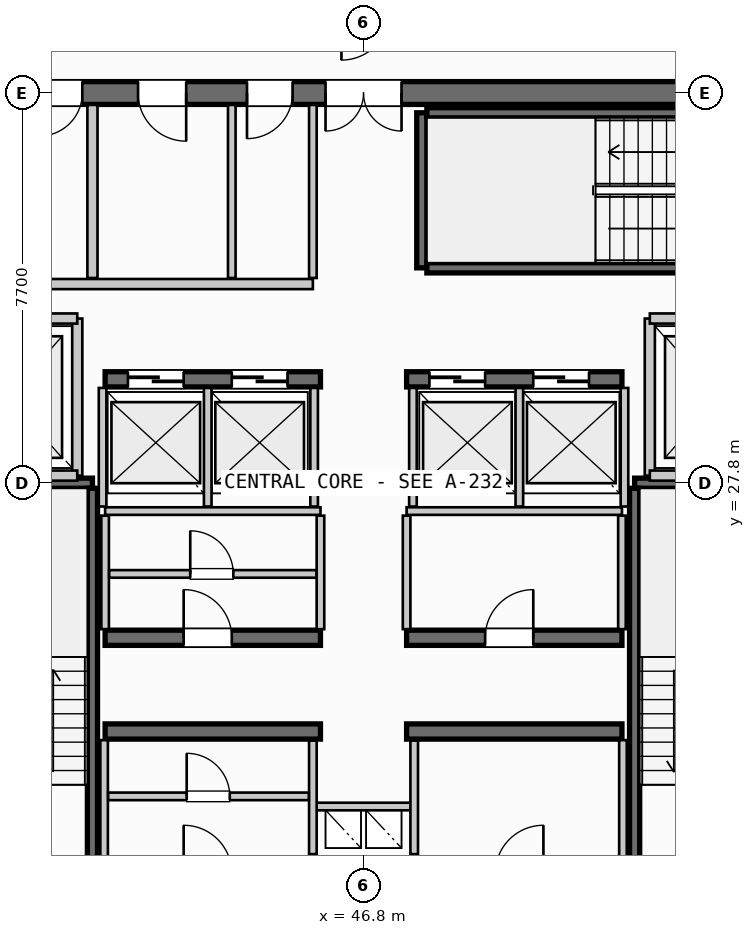
"""IFC4 building model, lengths in metres.
Left out: names, types, materials, properties, quantities, classifications, styles, units other than length and angle.
Written with IfcOpenShell. Run it as: python <this file> out.ifc"""

import sys

from ifc_helpers import new_model, si_unit, direction, frame, frame_2d, origin, place, context, subcontext, project, spatial, rectangle, extrude, source, transform, mapped, element, fill, save


model = new_model("IFC4")
c1 = context("Model", 3, precision=1e-05, world=origin(), true_north=direction((0.0, 1.0)))
c2 = subcontext(c1, "Body", "Model", "MODEL_VIEW")
j1 = project(units=[si_unit("LENGTHUNIT", "METRE"), si_unit("PLANEANGLEUNIT", "RADIAN")], contexts=[c1])
p1 = place(None, origin())
s1 = spatial("IfcSite", under=j1, at=p1, CompositionType="ELEMENT")
p2 = place(p1, origin())
s2 = spatial("IfcBuilding", under=s1, at=p2, CompositionType="ELEMENT")
p3 = place(p2, frame((0.0, 0.0, 235.3)))
s3 = spatial("IfcBuildingStorey", under=s2, at=p3, CompositionType="ELEMENT", Elevation=235.3)
p4 = place(p3, frame((55.6, 35.5, 0.0), z_axis=(0.0, 0.0, 1.0), x_axis=(-1.0, 0.0, 0.0)))
e1 = element("IfcWall", 1, at=p4, inside=s3, PredefinedType="SHEAR", context=c2, shape_type="SweptSolid", body=[
    extrude(rectangle(XDim=17.6, YDim=0.45, at=frame_2d((8.8, 0.0))), origin(), (0.0, 0.0, 1.0), 3.21),
])
p5 = place(p4, frame((8.05, 0.0, 0.0)))
e2 = element("IfcOpeningElement", 2, at=p5, cuts=e1, PredefinedType="OPENING", context=c2, shape_type="SweptSolid", body=[
    extrude(rectangle(XDim=1.5, YDim=2.2, at=frame_2d((0.75, 1.1))), frame((0.0, 0.235, 0.0), z_axis=(0.0, -1.0, 0.0), x_axis=(1.0, 0.0, 0.0)), (0.0, 0.0, 1.0), 0.47),
])
p6 = place(p4, frame((15.85, 0.0, 0.0)))
e3 = element("IfcOpeningElement", 3, at=p6, cuts=e1, PredefinedType="OPENING", context=c2, shape_type="SweptSolid", body=[
    extrude(rectangle(XDim=0.85, YDim=2.15, at=frame_2d((0.425, 1.075))), frame((0.0, 0.235, 0.0), z_axis=(0.0, -1.0, 0.0), x_axis=(1.0, 0.0, 0.0)), (0.0, 0.0, 1.0), 0.47),
])
p7 = place(p4, frame((14.35, 0.0, 0.0)))
e4 = element("IfcOpeningElement", 4, at=p7, cuts=e1, PredefinedType="OPENING", context=c2, shape_type="SweptSolid", body=[
    extrude(rectangle(XDim=0.85, YDim=2.15, at=frame_2d((0.425, 1.075))), frame((0.0, 0.235, 0.0), z_axis=(0.0, -1.0, 0.0), x_axis=(1.0, 0.0, 0.0)), (0.0, 0.0, 1.0), 0.47),
])
p8 = place(p4, frame((12.3, 0.0, 0.0)))
e5 = element("IfcOpeningElement", 5, at=p8, cuts=e1, PredefinedType="OPENING", context=c2, shape_type="SweptSolid", body=[
    extrude(rectangle(XDim=0.95, YDim=2.15, at=frame_2d((0.475, 1.075))), frame((0.0, 0.235, 0.0), z_axis=(0.0, -1.0, 0.0), x_axis=(1.0, 0.0, 0.0)), (0.0, 0.0, 1.0), 0.47),
])
p9 = place(p4, frame((10.2, 0.0, 0.0)))
e6 = element("IfcOpeningElement", 6, at=p9, cuts=e1, PredefinedType="OPENING", context=c2, shape_type="SweptSolid", body=[
    extrude(rectangle(XDim=0.9, YDim=2.15, at=frame_2d((0.45, 1.075))), frame((0.0, 0.235, 0.0), z_axis=(0.0, -1.0, 0.0), x_axis=(1.0, 0.0, 0.0)), (0.0, 0.0, 1.0), 0.47),
])
for number, where, z_axis, x_axis in (
    (7, (41.7, 22.9, 0.0), (0.0, 0.0, 1.0), (1.0, 0.0, 0.0)),
    (8, (47.65, 22.9, 0.0), (0.0, 0.0, 1.0), (1.0, 0.0, 0.0)),
):
    element("IfcWall", number, at=place(p3, frame(where, z_axis=z_axis, x_axis=x_axis)), inside=s3, PredefinedType="SHEAR", context=c2, shape_type="SweptSolid", body=[
        extrude(rectangle(XDim=4.25, YDim=0.3, at=frame_2d((2.125, 0.0))), origin(), (0.0, 0.0, 1.0), 3.21),
    ])
p10 = place(p3, frame((41.7, 24.75, 0.0), z_axis=(0.0, 0.0, 1.0), x_axis=(1.0, 0.0, 0.0)))
e9 = element("IfcWall", 9, at=p10, inside=s3, PredefinedType="SHEAR", context=c2, shape_type="SweptSolid", body=[
    extrude(rectangle(XDim=4.25, YDim=0.3, at=frame_2d((2.125, 0.0))), origin(), (0.0, 0.0, 1.0), 3.21),
])
p11 = place(p10, frame((1.55, 0.0, 0.0)))
e10 = element("IfcOpeningElement", 10, at=p11, cuts=e9, PredefinedType="OPENING", context=c2, shape_type="SweptSolid", body=[
    extrude(rectangle(XDim=0.95, YDim=2.15, at=frame_2d((0.475, 1.075))), frame((0.0, 0.16, 0.0), z_axis=(0.0, -1.0, 0.0), x_axis=(1.0, 0.0, 0.0)), (0.0, 0.0, 1.0), 0.32),
])
p12 = place(p3, frame((47.65, 24.75, 0.0), z_axis=(0.0, 0.0, 1.0), x_axis=(1.0, 0.0, 0.0)))
e11 = element("IfcWall", 11, at=p12, inside=s3, PredefinedType="SHEAR", context=c2, shape_type="SweptSolid", body=[
    extrude(rectangle(XDim=4.25, YDim=0.3, at=frame_2d((2.125, 0.0))), origin(), (0.0, 0.0, 1.0), 3.21),
])
p13 = place(p12, frame((1.55, 0.0, 0.0)))
e12 = element("IfcOpeningElement", 12, at=p13, cuts=e11, PredefinedType="OPENING", context=c2, shape_type="SweptSolid", body=[
    extrude(rectangle(XDim=0.95, YDim=2.15, at=frame_2d((0.475, 1.075))), frame((0.0, 0.16, 0.0), z_axis=(0.0, -1.0, 0.0), x_axis=(1.0, 0.0, 0.0)), (0.0, 0.0, 1.0), 0.32),
])
p14 = place(p3, frame((41.7, 29.85, 0.0), z_axis=(0.0, 0.0, 1.0), x_axis=(1.0, 0.0, 0.0)))
e13 = element("IfcWall", 13, at=p14, inside=s3, PredefinedType="SHEAR", context=c2, shape_type="SweptSolid", body=[
    extrude(rectangle(XDim=4.25, YDim=0.3, at=frame_2d((2.125, 0.0))), origin(), (0.0, 0.0, 1.0), 3.21),
])
p15 = place(p14, frame((0.45, 0.0, 0.0)))
e14 = element("IfcOpeningElement", 14, at=p15, cuts=e13, PredefinedType="OPENING", context=c2, shape_type="SweptSolid", body=[
    extrude(rectangle(XDim=1.1, YDim=2.2, at=frame_2d((0.55, 1.1))), frame((0.0, 0.16, 0.0), z_axis=(0.0, -1.0, 0.0), x_axis=(1.0, 0.0, 0.0)), (0.0, 0.0, 1.0), 0.32),
])
p16 = place(p14, frame((2.5, 0.0, 0.0)))
e15 = element("IfcOpeningElement", 15, at=p16, cuts=e13, PredefinedType="OPENING", context=c2, shape_type="SweptSolid", body=[
    extrude(rectangle(XDim=1.1, YDim=2.2, at=frame_2d((0.55, 1.1))), frame((0.0, 0.16, 0.0), z_axis=(0.0, -1.0, 0.0), x_axis=(1.0, 0.0, 0.0)), (0.0, 0.0, 1.0), 0.32),
])
p17 = place(p3, frame((47.65, 29.85, 0.0), z_axis=(0.0, 0.0, 1.0), x_axis=(1.0, 0.0, 0.0)))
e16 = element("IfcWall", 16, at=p17, inside=s3, PredefinedType="SHEAR", context=c2, shape_type="SweptSolid", body=[
    extrude(rectangle(XDim=4.25, YDim=0.3, at=frame_2d((2.125, 0.0))), origin(), (0.0, 0.0, 1.0), 3.21),
])
p18 = place(p17, frame((0.45, 0.0, 0.0)))
e17 = element("IfcOpeningElement", 17, at=p18, cuts=e16, PredefinedType="OPENING", context=c2, shape_type="SweptSolid", body=[
    extrude(rectangle(XDim=1.1, YDim=2.2, at=frame_2d((0.55, 1.1))), frame((0.0, 0.16, 0.0), z_axis=(0.0, -1.0, 0.0), x_axis=(1.0, 0.0, 0.0)), (0.0, 0.0, 1.0), 0.32),
])
p19 = place(p17, frame((2.5, 0.0, 0.0)))
e18 = element("IfcOpeningElement", 18, at=p19, cuts=e16, PredefinedType="OPENING", context=c2, shape_type="SweptSolid", body=[
    extrude(rectangle(XDim=1.1, YDim=2.2, at=frame_2d((0.55, 1.1))), frame((0.0, 0.16, 0.0), z_axis=(0.0, -1.0, 0.0), x_axis=(1.0, 0.0, 0.0)), (0.0, 0.0, 1.0), 0.32),
])
p20 = place(p3, frame((38.39, 27.8, 0.0), z_axis=(0.0, 0.0, 1.0), x_axis=(1.0, 0.0, 0.0)))
e19 = element("IfcWall", 19, at=p20, inside=s3, PredefinedType="SHEAR", context=c2, shape_type="SweptSolid", body=[
    extrude(rectangle(XDim=3.06, YDim=0.2, at=frame_2d((1.53, 0.0))), origin(), (0.0, 0.0, 1.0), 3.21),
])
p21 = place(p3, frame((41.45, 27.7, 0.0), z_axis=(0.0, 0.0, 1.0), x_axis=(0.0, -1.0, 0.0)))
e20 = element("IfcWall", 20, at=p21, inside=s3, PredefinedType="SHEAR", context=c2, shape_type="SweptSolid", body=[
    extrude(rectangle(XDim=7.35, YDim=0.2, at=frame_2d((3.675, 0.0))), origin(), (0.0, 0.0, 1.0), 3.21),
])
p22 = place(p3, frame((52.15, 27.8, 0.0), z_axis=(0.0, 0.0, 1.0), x_axis=(1.0, 0.0, 0.0)))
e21 = element("IfcWall", 21, at=p22, inside=s3, PredefinedType="SHEAR", context=c2, shape_type="SweptSolid", body=[
    extrude(rectangle(XDim=3.06, YDim=0.2, at=frame_2d((1.53, 0.0))), origin(), (0.0, 0.0, 1.0), 3.21),
])
p23 = place(p3, frame((52.15, 20.35, 0.0), z_axis=(0.0, 0.0, 1.0), x_axis=(0.0, 1.0, 0.0)))
e22 = element("IfcWall", 22, at=p23, inside=s3, PredefinedType="SHEAR", context=c2, shape_type="SweptSolid", body=[
    extrude(rectangle(XDim=7.35, YDim=0.2, at=frame_2d((3.675, 0.0))), origin(), (0.0, 0.0, 1.0), 3.21),
])
p24 = place(p3, frame((47.95, 32.05, 0.0), z_axis=(0.0, 0.0, 1.0), x_axis=(0.0, 1.0, 0.0)))
e23 = element("IfcWall", 23, at=p24, inside=s3, PredefinedType="SHEAR", context=c2, shape_type="SweptSolid", body=[
    extrude(rectangle(XDim=3.06, YDim=0.2, at=frame_2d((1.53, 0.0))), origin(), (0.0, 0.0, 1.0), 3.21),
])
for number, where, z_axis, x_axis in (
    (24, (48.05, 35.11, 0.0), (0.0, 0.0, 1.0), (1.0, 0.0, 0.0)),
    (25, (55.4, 32.05, 0.0), (0.0, 0.0, 1.0), (-1.0, 0.0, 0.0)),
):
    element("IfcWall", number, at=place(p3, frame(where, z_axis=z_axis, x_axis=x_axis)), inside=s3, PredefinedType="SHEAR", context=c2, shape_type="SweptSolid", body=[
        extrude(rectangle(XDim=7.35, YDim=0.2, at=frame_2d((3.675, 0.0))), origin(), (0.0, 0.0, 1.0), 3.21),
    ])
p25 = place(p3, frame((45.8, 21.42, 0.0), z_axis=(0.0, 0.0, 1.0), x_axis=(1.0, 0.0, 0.0)))
e26 = element("IfcWall", 26, at=p25, inside=s3, PredefinedType="PARTITIONING", context=c2, shape_type="SweptSolid", body=[
    extrude(rectangle(XDim=2.0, YDim=0.15, at=frame_2d((1.0, 0.0))), origin(), (0.0, 0.0, 1.0), 2.28),
])
for number, where, z_axis, x_axis in (
    (27, (45.8, 20.48, 0.0), (0.0, 0.0, 1.0), (0.0, 1.0, 0.0)),
    (28, (47.8, 20.48, 0.0), (0.0, 0.0, 1.0), (0.0, 1.0, 0.0)),
):
    element("IfcWall", number, at=place(p3, frame(where, z_axis=z_axis, x_axis=x_axis)), inside=s3, PredefinedType="PARTITIONING", context=c2, shape_type="SweptSolid", body=[
        extrude(rectangle(XDim=2.24, YDim=0.15, at=frame_2d((1.12, 0.0))), origin(), (0.0, 0.0, 1.0), 2.28),
    ])
p26 = place(p3, frame((41.15, 27.95, 0.0), z_axis=(0.0, 0.0, 1.0), x_axis=(0.0, 1.0, 0.0)))
e29 = element("IfcWall", 29, at=p26, inside=s3, PredefinedType="PARTITIONING", context=c2, shape_type="SweptSolid", body=[
    extrude(rectangle(XDim=3.1, YDim=0.2, at=frame_2d((1.55, 0.0))), origin(), (0.0, 0.0, 1.0), 2.28),
])
for number, where, z_axis, x_axis in (
    (30, (38.235, 27.95, 0.0), (0.0, 0.0, 1.0), (1.0, 0.0, 0.0)),
    (31, (38.235, 31.05, 0.0), (0.0, 0.0, 1.0), (1.0, 0.0, 0.0)),
):
    element("IfcWall", number, at=place(p3, frame(where, z_axis=z_axis, x_axis=x_axis)), inside=s3, PredefinedType="PARTITIONING", context=c2, shape_type="SweptSolid", body=[
        extrude(rectangle(XDim=2.915, YDim=0.2, at=frame_2d((1.458, 0.0))), origin(), (0.0, 0.0, 1.0), 2.28),
    ])
p27 = place(p3, frame((52.45, 27.95, 0.0), z_axis=(0.0, 0.0, 1.0), x_axis=(0.0, 1.0, 0.0)))
e32 = element("IfcWall", 32, at=p27, inside=s3, PredefinedType="PARTITIONING", context=c2, shape_type="SweptSolid", body=[
    extrude(rectangle(XDim=3.1, YDim=0.2, at=frame_2d((1.55, 0.0))), origin(), (0.0, 0.0, 1.0), 2.28),
])
for number, where, z_axis, x_axis in (
    (33, (52.45, 27.95, 0.0), (0.0, 0.0, 1.0), (1.0, 0.0, 0.0)),
    (34, (52.45, 31.05, 0.0), (0.0, 0.0, 1.0), (1.0, 0.0, 0.0)),
):
    element("IfcWall", number, at=place(p3, frame(where, z_axis=z_axis, x_axis=x_axis)), inside=s3, PredefinedType="PARTITIONING", context=c2, shape_type="SweptSolid", body=[
        extrude(rectangle(XDim=2.915, YDim=0.2, at=frame_2d((1.458, 0.0))), origin(), (0.0, 0.0, 1.0), 2.28),
    ])
for number, where, z_axis, x_axis in (
    (35, (41.68, 20.335, 0.0), (0.0, 0.0, 1.0), (0.0, 1.0, 0.0)),
    (36, (51.92, 20.335, 0.0), (0.0, 0.0, 1.0), (0.0, 1.0, 0.0)),
):
    element("IfcWall", number, at=place(p3, frame(where, z_axis=z_axis, x_axis=x_axis)), inside=s3, PredefinedType="PARTITIONING", context=c2, shape_type="SweptSolid", body=[
        extrude(rectangle(XDim=2.395, YDim=0.15, at=frame_2d((1.198, 0.0))), origin(), (0.0, 0.0, 1.0), 2.28),
    ])
p28 = place(p3, frame((41.76, 21.62, 0.0), z_axis=(0.0, 0.0, 1.0), x_axis=(1.0, 0.0, 0.0)))
e37 = element("IfcWall", 37, at=p28, inside=s3, PredefinedType="PARTITIONING", context=c2, shape_type="SweptSolid", body=[
    extrude(rectangle(XDim=3.96, YDim=0.15, at=frame_2d((1.98, 0.0))), origin(), (0.0, 0.0, 1.0), 2.28),
])
p29 = place(p28, frame((1.55, 0.0, 0.0)))
e38 = element("IfcOpeningElement", 38, at=p29, cuts=e37, PredefinedType="OPENING", context=c2, shape_type="SweptSolid", body=[
    extrude(rectangle(XDim=0.85, YDim=2.15, at=frame_2d((0.425, 1.075))), frame((0.0, 0.085, 0.0), z_axis=(0.0, -1.0, 0.0), x_axis=(1.0, 0.0, 0.0)), (0.0, 0.0, 1.0), 0.17),
])
for number, where, z_axis, x_axis in (
    (39, (41.7, 27.25, 0.0), (0.0, 0.0, 1.0), (1.0, 0.0, 0.0)),
    (40, (47.65, 27.25, 0.0), (0.0, 0.0, 1.0), (1.0, 0.0, 0.0)),
):
    element("IfcWall", number, at=place(p3, frame(where, z_axis=z_axis, x_axis=x_axis)), inside=s3, PredefinedType="PARTITIONING", context=c2, shape_type="SweptSolid", body=[
        extrude(rectangle(XDim=4.25, YDim=0.15, at=frame_2d((2.125, 0.0))), origin(), (0.0, 0.0, 1.0), 2.28),
    ])
for number, where, z_axis, x_axis in (
    (41, (41.7, 24.92, 0.0), (0.0, 0.0, 1.0), (0.0, 1.0, 0.0)),
    (42, (45.95, 24.92, 0.0), (0.0, 0.0, 1.0), (0.0, 1.0, 0.0)),
    (43, (47.65, 24.92, 0.0), (0.0, 0.0, 1.0), (0.0, 1.0, 0.0)),
    (44, (51.9, 24.92, 0.0), (0.0, 0.0, 1.0), (0.0, 1.0, 0.0)),
):
    element("IfcWall", number, at=place(p3, frame(where, z_axis=z_axis, x_axis=x_axis)), inside=s3, PredefinedType="PARTITIONING", context=c2, shape_type="SweptSolid", body=[
        extrude(rectangle(XDim=2.24, YDim=0.15, at=frame_2d((1.12, 0.0))), origin(), (0.0, 0.0, 1.0), 2.28),
    ])
p30 = place(p3, frame((41.78, 26.01, 0.0), z_axis=(0.0, 0.0, 1.0), x_axis=(1.0, 0.0, 0.0)))
e45 = element("IfcWall", 45, at=p30, inside=s3, PredefinedType="PARTITIONING", context=c2, shape_type="SweptSolid", body=[
    extrude(rectangle(XDim=4.09, YDim=0.15, at=frame_2d((2.045, 0.0))), origin(), (0.0, 0.0, 1.0), 2.28),
])
p31 = place(p30, frame((1.6, 0.0, 0.0)))
e46 = element("IfcOpeningElement", 46, at=p31, cuts=e45, PredefinedType="OPENING", context=c2, shape_type="SweptSolid", body=[
    extrude(rectangle(XDim=0.85, YDim=2.15, at=frame_2d((0.425, 1.075))), frame((0.0, 0.085, 0.0), z_axis=(0.0, -1.0, 0.0), x_axis=(1.0, 0.0, 0.0)), (0.0, 0.0, 1.0), 0.17),
])
for number, where, z_axis, x_axis in (
    (47, (41.65, 27.34, 0.0), (0.0, 0.0, 1.0), (0.0, 1.0, 0.0)),
    (48, (43.725, 27.34, 0.0), (0.0, 0.0, 1.0), (0.0, 1.0, 0.0)),
    (49, (45.825, 27.34, 0.0), (0.0, 0.0, 1.0), (0.0, 1.0, 0.0)),
    (50, (47.775, 27.34, 0.0), (0.0, 0.0, 1.0), (0.0, 1.0, 0.0)),
    (51, (49.875, 27.34, 0.0), (0.0, 0.0, 1.0), (0.0, 1.0, 0.0)),
    (52, (51.95, 27.34, 0.0), (0.0, 0.0, 1.0), (0.0, 1.0, 0.0)),
):
    element("IfcWall", number, at=place(p3, frame(where, z_axis=z_axis, x_axis=x_axis)), inside=s3, PredefinedType="PARTITIONING", context=c2, shape_type="SweptSolid", body=[
        extrude(rectangle(XDim=2.34, YDim=0.15, at=frame_2d((1.17, 0.0))), origin(), (0.0, 0.0, 1.0), 2.28),
    ])
p32 = place(p3, frame((41.45, 31.85, 0.0), z_axis=(0.0, 0.0, 1.0), x_axis=(0.0, 1.0, 0.0)))
e53 = element("IfcWall", 53, at=p32, inside=s3, PredefinedType="PARTITIONING", context=c2, shape_type="SweptSolid", body=[
    extrude(rectangle(XDim=3.415, YDim=0.2, at=frame_2d((1.708, 0.0))), origin(), (0.0, 0.0, 1.0), 2.28),
])
p33 = place(p3, frame((38.235, 31.73, 0.0), z_axis=(0.0, 0.0, 1.0), x_axis=(1.0, 0.0, 0.0)))
e54 = element("IfcWall", 54, at=p33, inside=s3, PredefinedType="PARTITIONING", context=c2, shape_type="SweptSolid", body=[
    extrude(rectangle(XDim=7.565, YDim=0.2, at=frame_2d((3.782, 0.0))), origin(), (0.0, 0.0, 1.0), 2.28),
])
p34 = place(p3, frame((45.8, 31.85, 0.0), z_axis=(0.0, 0.0, 1.0), x_axis=(0.0, 1.0, 0.0)))
e55 = element("IfcWall", 55, at=p34, inside=s3, PredefinedType="PARTITIONING", context=c2, shape_type="SweptSolid", body=[
    extrude(rectangle(XDim=3.415, YDim=0.15, at=frame_2d((1.708, 0.0))), origin(), (0.0, 0.0, 1.0), 2.28),
])
p35 = place(p3, frame((44.2, 31.85, 0.0), z_axis=(0.0, 0.0, 1.0), x_axis=(0.0, 1.0, 0.0)))
e56 = element("IfcWall", 56, at=p35, inside=s3, PredefinedType="PLUMBINGWALL", context=c2, shape_type="SweptSolid", body=[
    extrude(rectangle(XDim=3.415, YDim=0.15, at=frame_2d((1.708, 0.0))), origin(), (0.0, 0.0, 1.0), 2.28),
])
m1 = source(origin(), c2, "Body", "SweptSolid", [
    extrude(rectangle(XDim=1.5, YDim=2.2, at=frame_2d((0.75, 1.1))), frame((0.0, 0.025, 0.0), z_axis=(0.0, -1.0, 0.0), x_axis=(1.0, 0.0, 0.0)), (0.0, 0.0, 1.0), 0.05),
])
p36 = place(p5, origin())
e57 = element("IfcDoor", 57, at=p36, inside=s3, OperationType="DOUBLE_DOOR_SINGLE_SWING", PredefinedType="DOOR", context=c2, shape_type="MappedRepresentation", body=[
    mapped(m1, transform((0.0, 0.0, 0.0), scale=1.0)),
])
fill(e2, e57)
m2 = source(origin(), c2, "Body", "SweptSolid", [
    extrude(rectangle(XDim=0.95, YDim=2.15, at=frame_2d((0.475, 1.075))), frame((0.0, 0.025, 0.0), z_axis=(0.0, -1.0, 0.0), x_axis=(1.0, 0.0, 0.0)), (0.0, 0.0, 1.0), 0.05),
])
p37 = place(p11, origin())
e58 = element("IfcDoor", 58, at=p37, inside=s3, OperationType="SINGLE_SWING_LEFT", PredefinedType="DOOR", context=c2, shape_type="MappedRepresentation", body=[
    mapped(m2, transform((0.0, 0.0, 0.0), scale=1.0)),
])
fill(e10, e58)
p38 = place(p13, origin())
e59 = element("IfcDoor", 59, at=p38, inside=s3, OperationType="SINGLE_SWING_RIGHT", PredefinedType="DOOR", context=c2, shape_type="MappedRepresentation", body=[
    mapped(m2, transform((0.0, 0.0, 0.0), scale=1.0)),
])
fill(e12, e59)
m3 = source(origin(), c2, "Body", "SweptSolid", [
    extrude(rectangle(XDim=1.1, YDim=2.2, at=frame_2d((0.55, 1.1))), frame((0.0, 0.025, 0.0), z_axis=(0.0, -1.0, 0.0), x_axis=(1.0, 0.0, 0.0)), (0.0, 0.0, 1.0), 0.05),
])
p39 = place(p15, origin())
e60 = element("IfcDoor", 60, at=p39, inside=s3, OperationType="SLIDING_TO_LEFT", PredefinedType="DOOR", context=c2, shape_type="MappedRepresentation", body=[
    mapped(m3, transform((0.0, 0.0, 0.0), scale=1.0)),
])
fill(e14, e60)
p40 = place(p16, origin())
e61 = element("IfcDoor", 61, at=p40, inside=s3, OperationType="SLIDING_TO_LEFT", PredefinedType="DOOR", context=c2, shape_type="MappedRepresentation", body=[
    mapped(m3, transform((0.0, 0.0, 0.0), scale=1.0)),
])
fill(e15, e61)
p41 = place(p18, origin())
e62 = element("IfcDoor", 62, at=p41, inside=s3, OperationType="SLIDING_TO_LEFT", PredefinedType="DOOR", context=c2, shape_type="MappedRepresentation", body=[
    mapped(m3, transform((0.0, 0.0, 0.0), scale=1.0)),
])
fill(e17, e62)
p42 = place(p19, origin())
e63 = element("IfcDoor", 63, at=p42, inside=s3, OperationType="SLIDING_TO_LEFT", PredefinedType="DOOR", context=c2, shape_type="MappedRepresentation", body=[
    mapped(m3, transform((0.0, 0.0, 0.0), scale=1.0)),
])
fill(e18, e63)
m4 = source(origin(), c2, "Body", "SweptSolid", [
    extrude(rectangle(XDim=0.85, YDim=2.15, at=frame_2d((0.425, 1.075))), frame((0.0, 0.025, 0.0), z_axis=(0.0, -1.0, 0.0), x_axis=(1.0, 0.0, 0.0)), (0.0, 0.0, 1.0), 0.05),
])
p43 = place(p7, origin())
e64 = element("IfcDoor", 64, at=p43, inside=s3, OperationType="SINGLE_SWING_RIGHT", PredefinedType="DOOR", context=c2, shape_type="MappedRepresentation", body=[
    mapped(m4, transform((0.0, 0.0, 0.0), scale=1.0)),
])
fill(e4, e64)
p44 = place(p8, origin())
e65 = element("IfcDoor", 65, at=p44, inside=s3, OperationType="SINGLE_SWING_LEFT", PredefinedType="DOOR", context=c2, shape_type="MappedRepresentation", body=[
    mapped(m2, transform((0.0, 0.0, 0.0), scale=1.0)),
])
fill(e5, e65)
m5 = source(origin(), c2, "Body", "SweptSolid", [
    extrude(rectangle(XDim=0.9, YDim=2.15, at=frame_2d((0.45, 1.075))), frame((0.0, 0.025, 0.0), z_axis=(0.0, -1.0, 0.0), x_axis=(1.0, 0.0, 0.0)), (0.0, 0.0, 1.0), 0.05),
])
p45 = place(p9, origin())
e66 = element("IfcDoor", 66, at=p45, inside=s3, OperationType="SINGLE_SWING_RIGHT", PredefinedType="DOOR", context=c2, shape_type="MappedRepresentation", body=[
    mapped(m5, transform((0.0, 0.0, 0.0), scale=1.0)),
])
fill(e6, e66)
p46 = place(p29, origin())
e67 = element("IfcDoor", 67, at=p46, inside=s3, OperationType="SINGLE_SWING_LEFT", PredefinedType="DOOR", context=c2, shape_type="MappedRepresentation", body=[
    mapped(m4, transform((0.0, 0.0, 0.0), scale=1.0)),
])
fill(e38, e67)
p47 = place(p31, origin())
e68 = element("IfcDoor", 68, at=p47, inside=s3, OperationType="SINGLE_SWING_LEFT", PredefinedType="DOOR", context=c2, shape_type="MappedRepresentation", body=[
    mapped(m4, transform((0.0, 0.0, 0.0), scale=1.0)),
])
fill(e46, e68)
save(model, sys.argv[1])
